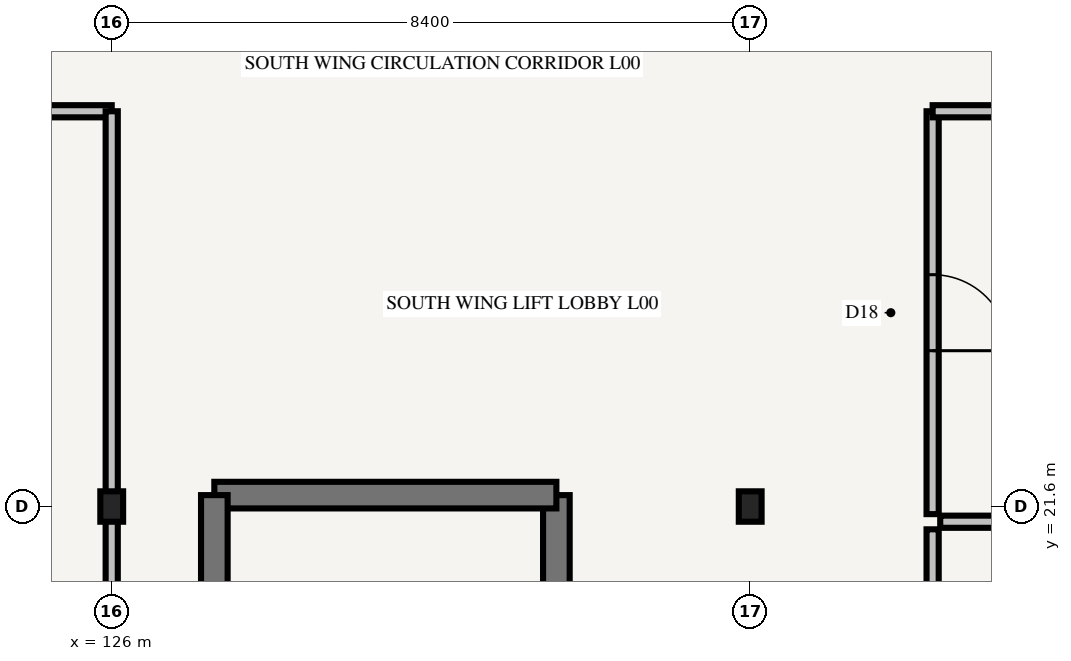
"""IFC4 building model, lengths in metres.
Left out: names, types, materials, properties, quantities, classifications, styles, units other than length and angle.
Written with IfcOpenShell. Run it as: python <this file> out.ifc"""

import sys

from ifc_helpers import new_model, si_unit, direction, frame, frame_2d, origin, origin_2d, place, context, subcontext, project, spatial, rectangle, i_section, extrude, element, fill, save


model = new_model("IFC4")
c1 = context("Model", 3, precision=1e-05, world=origin(), true_north=direction((0.0, 1.0)))
c2 = subcontext(c1, "Body", "Model", "MODEL_VIEW")
j1 = project(units=[si_unit("LENGTHUNIT", "METRE"), si_unit("PLANEANGLEUNIT", "RADIAN")], contexts=[c1])
p1 = place(None, origin())
s1 = spatial("IfcSite", under=j1, at=p1, CompositionType="ELEMENT")
p2 = place(p1, origin())
s2 = spatial("IfcBuilding", under=s1, at=p2, CompositionType="ELEMENT")
p3 = place(p2, origin())
s3 = spatial("IfcBuildingStorey", under=s2, at=p3, CompositionType="ELEMENT", Elevation=0.0)
for number, where, z_axis, x_axis in (
    (1, (126.0, 21.6, -0.42), (0.0, 0.0, 1.0), (1.0, 0.0, 0.0)),
    (2, (134.4, 21.6, -0.42), (0.0, 0.0, 1.0), (1.0, 0.0, 0.0)),
):
    element("IfcColumn", number, at=place(p3, frame(where, z_axis=z_axis, x_axis=x_axis)), inside=s3, PredefinedType="COLUMN", context=c2, shape_type="SweptSolid", body=[
        extrude(i_section(OverallWidth=0.3, OverallDepth=0.4, WebThickness=0.013, FlangeThickness=0.024, FilletRadius=0.027, at=origin_2d()), origin(), (0.0, 0.0, 1.0), 4.92),
    ])
p4 = place(p3, frame((131.85, 14.65, 0.0), z_axis=(0.0, 0.0, 1.0), x_axis=(0.0, 1.0, 0.0)))
e3 = element("IfcWall", 3, at=p4, inside=s3, PredefinedType="SHEAR", context=c2, shape_type="SweptSolid", body=[
    extrude(rectangle(XDim=7.1, YDim=0.35, at=frame_2d((3.55, 0.0))), origin(), (0.0, 0.0, 1.0), 4.32),
])
p5 = place(p3, frame((131.85, 21.75, 0.0), z_axis=(0.0, 0.0, 1.0), x_axis=(-1.0, 0.0, 0.0)))
e4 = element("IfcWall", 4, at=p5, inside=s3, PredefinedType="SHEAR", context=c2, shape_type="SweptSolid", body=[
    extrude(rectangle(XDim=4.5, YDim=0.35, at=frame_2d((2.25, 0.0))), origin(), (0.0, 0.0, 1.0), 4.32),
])
p6 = place(p3, frame((127.35, 21.75, 0.0), z_axis=(0.0, 0.0, 1.0), x_axis=(0.0, -1.0, 0.0)))
e5 = element("IfcWall", 5, at=p6, inside=s3, PredefinedType="SHEAR", context=c2, shape_type="SweptSolid", body=[
    extrude(rectangle(XDim=7.1, YDim=0.35, at=frame_2d((3.55, 0.0))), origin(), (0.0, 0.0, 1.0), 4.32),
])
p7 = place(p3, frame((109.2, 26.8, 0.0), z_axis=(0.0, 0.0, 1.0), x_axis=(1.0, 0.0, 0.0)))
e6 = element("IfcWall", 6, at=p7, inside=s3, PredefinedType="PARTITIONING", context=c2, shape_type="SweptSolid", body=[
    extrude(rectangle(XDim=16.8, YDim=0.16, at=frame_2d((8.4, 0.0))), origin(), (0.0, 0.0, 1.0), 3.62),
])
p8 = place(p7, frame((7.825, 0.0, 0.0)))
e7 = element("IfcOpeningElement", 7, at=p8, cuts=e6, PredefinedType="OPENING", context=c2, shape_type="SweptSolid", body=[
    extrude(rectangle(XDim=1.15, YDim=2.15, at=frame_2d((0.575, 1.075))), frame((0.0, 0.105, 0.0), z_axis=(0.0, -1.0, 0.0), x_axis=(1.0, 0.0, 0.0)), (0.0, 0.0, 1.0), 0.21),
])
p9 = place(p3, frame((126.0, 7.35, 0.0), z_axis=(0.0, 0.0, 1.0), x_axis=(0.0, 1.0, 0.0)))
e8 = element("IfcWall", 8, at=p9, inside=s3, PredefinedType="PARTITIONING", context=c2, shape_type="SweptSolid", body=[
    extrude(rectangle(XDim=19.45, YDim=0.16, at=frame_2d((9.725, 0.0))), origin(), (0.0, 0.0, 1.0), 3.62),
])
p10 = place(p3, frame((136.8, 14.5, 0.0), z_axis=(0.0, 0.0, 1.0), x_axis=(0.0, 1.0, 0.0)))
e9 = element("IfcWall", 9, at=p10, inside=s3, PredefinedType="PARTITIONING", context=c2, shape_type="SweptSolid", body=[
    extrude(rectangle(XDim=6.8, YDim=0.16, at=frame_2d((3.4, 0.0))), origin(), (0.0, 0.0, 1.0), 3.62),
])
p11 = place(p10, frame((2.925, 0.0, 0.0)))
e10 = element("IfcOpeningElement", 10, at=p11, cuts=e9, PredefinedType="OPENING", context=c2, shape_type="SweptSolid", body=[
    extrude(rectangle(XDim=0.95, YDim=2.15, at=frame_2d((0.475, 1.075))), frame((0.0, 0.105, 0.0), z_axis=(0.0, -1.0, 0.0), x_axis=(1.0, 0.0, 0.0)), (0.0, 0.0, 1.0), 0.21),
])
p12 = place(p3, frame((136.8, 21.5, 0.0), z_axis=(0.0, 0.0, 1.0), x_axis=(0.0, 1.0, 0.0)))
e11 = element("IfcWall", 11, at=p12, inside=s3, PredefinedType="PARTITIONING", context=c2, shape_type="SweptSolid", body=[
    extrude(rectangle(XDim=5.3, YDim=0.16, at=frame_2d((2.65, 0.0))), origin(), (0.0, 0.0, 1.0), 3.62),
])
p13 = place(p12, frame((2.15, 0.0, 0.0)))
e12 = element("IfcOpeningElement", 12, at=p13, cuts=e11, PredefinedType="OPENING", context=c2, shape_type="SweptSolid", body=[
    extrude(rectangle(XDim=1.0, YDim=2.15, at=frame_2d((0.5, 1.075))), frame((0.0, 0.105, 0.0), z_axis=(0.0, -1.0, 0.0), x_axis=(1.0, 0.0, 0.0)), (0.0, 0.0, 1.0), 0.21),
])
p14 = place(p3, frame((136.9, 21.4, 0.0), z_axis=(0.0, 0.0, 1.0), x_axis=(1.0, 0.0, 0.0)))
e13 = element("IfcWall", 13, at=p14, inside=s3, PredefinedType="PARTITIONING", context=c2, shape_type="SweptSolid", body=[
    extrude(rectangle(XDim=5.9, YDim=0.16, at=frame_2d((2.95, 0.0))), origin(), (0.0, 0.0, 1.0), 3.62),
])
p15 = place(p3, frame((136.8, 26.8, 0.0), z_axis=(0.0, 0.0, 1.0), x_axis=(1.0, 0.0, 0.0)))
e14 = element("IfcWall", 14, at=p15, inside=s3, PredefinedType="PARTITIONING", context=c2, shape_type="SweptSolid", body=[
    extrude(rectangle(XDim=6.0, YDim=0.16, at=frame_2d((3.0, 0.0))), origin(), (0.0, 0.0, 1.0), 3.62),
])
p16 = place(p13, origin())
e15 = element("IfcDoor", 15, at=p16, inside=s3, OperationType="SINGLE_SWING_RIGHT", PredefinedType="DOOR", context=c2, shape_type="SweptSolid", body=[
    extrude(rectangle(XDim=1.0, YDim=2.15, at=frame_2d((0.5, 1.075))), frame((0.0, 0.025, 0.0), z_axis=(0.0, -1.0, 0.0), x_axis=(1.0, 0.0, 0.0)), (0.0, 0.0, 1.0), 0.05),
])
fill(e12, e15)
save(model, sys.argv[1])
